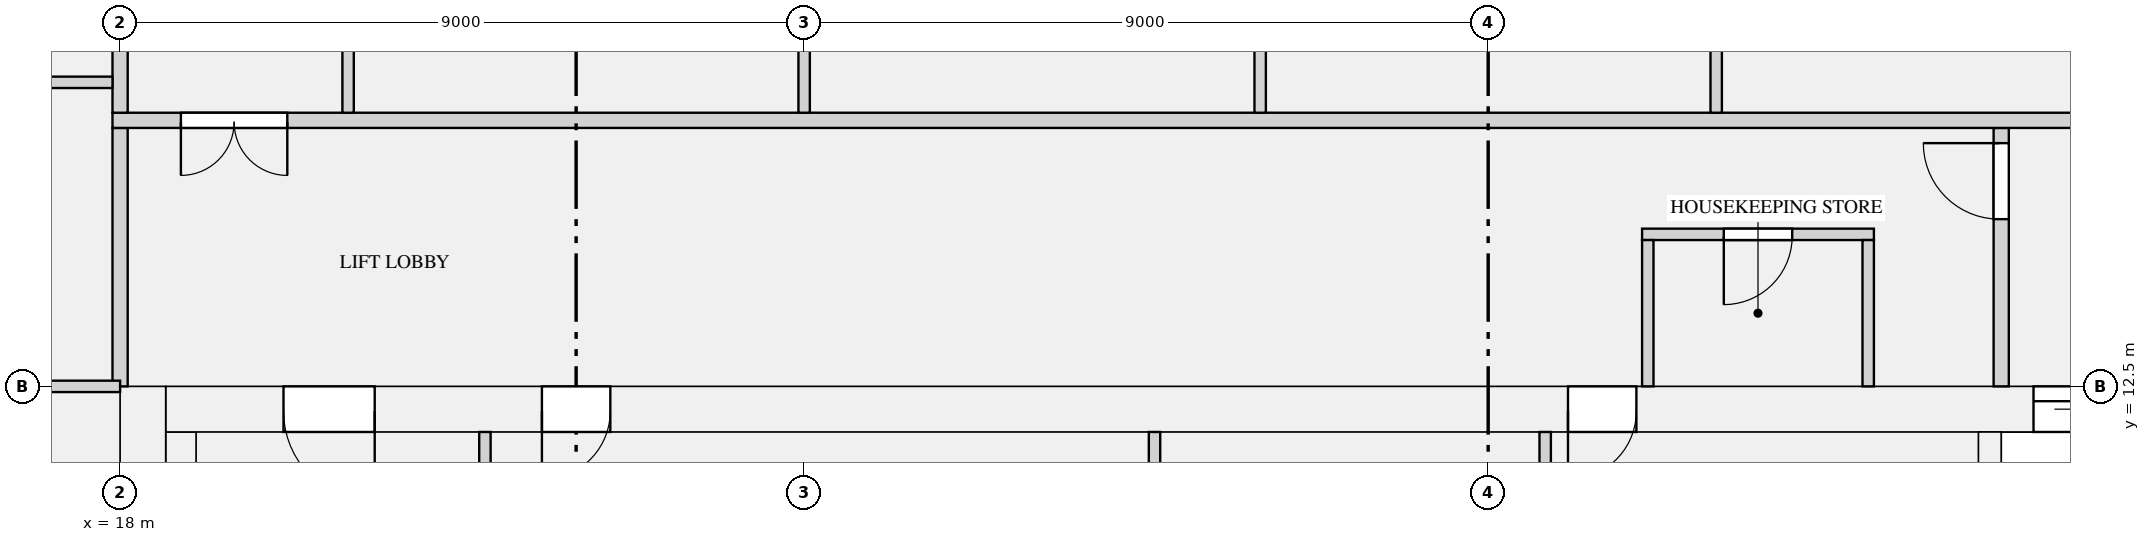
"""IFC4 building model, lengths in metres.
Left out: names, types, materials, properties, quantities, classifications, styles, units other than length and angle.
Written with IfcOpenShell. Run it as: python <this file> out.ifc"""

import sys

from ifc_helpers import new_model, si_unit, direction, frame, frame_2d, origin, place, context, subcontext, project, spatial, rectangle, extrude, element, fill, save


model = new_model("IFC4")
c1 = context("Model", 3, precision=1e-05, world=origin(), true_north=direction((0.0, 1.0)))
c2 = subcontext(c1, "Body", "Model", "MODEL_VIEW")
j1 = project(units=[si_unit("LENGTHUNIT", "METRE"), si_unit("PLANEANGLEUNIT", "RADIAN")], contexts=[c1])
p1 = place(None, origin())
s1 = spatial("IfcSite", under=j1, at=p1, CompositionType="ELEMENT")
p2 = place(p1, origin())
s2 = spatial("IfcBuilding", under=s1, at=p2, CompositionType="ELEMENT")
p3 = place(p2, frame((0.0, 0.0, 198.0)))
s3 = spatial("IfcBuildingStorey", under=s2, at=p3, CompositionType="ELEMENT", Elevation=198.0)
p4 = place(p3, frame((18.3, 0.0, 0.0), z_axis=(0.0, 0.0, 1.0), x_axis=(0.0, 1.0, 0.0)))
e1 = element("IfcWall", 1, at=p4, inside=s3, PredefinedType="SHEAR", context=c2, shape_type="SweptSolid", body=[
    extrude(rectangle(XDim=12.5, YDim=0.6, at=frame_2d((6.25, 0.0))), origin(), (0.0, 0.0, 1.0), 3.15),
])
p5 = place(p3, frame((18.6, 12.2, 0.0), z_axis=(0.0, 0.0, 1.0), x_axis=(1.0, 0.0, 0.0)))
e2 = element("IfcWall", 2, at=p5, inside=s3, PredefinedType="SHEAR", context=c2, shape_type="SweptSolid", body=[
    extrude(rectangle(XDim=34.8, YDim=0.6, at=frame_2d((17.4, 0.0))), origin(), (0.0, 0.0, 1.0), 3.15),
])
p6 = place(p5, frame((24.575, 0.0, 0.0)))
e3 = element("IfcOpeningElement", 3, at=p6, cuts=e2, PredefinedType="OPENING", context=c2, shape_type="SweptSolid", body=[
    extrude(rectangle(XDim=1.1, YDim=2.1, at=frame_2d((0.55, 1.05))), frame((0.0, 0.31, 0.0), z_axis=(0.0, -1.0, 0.0), x_axis=(1.0, 0.0, 0.0)), (0.0, 0.0, 1.0), 0.62),
])
p7 = place(p5, frame((26.825, 0.0, 0.0)))
e4 = element("IfcOpeningElement", 4, at=p7, cuts=e2, PredefinedType="OPENING", context=c2, shape_type="SweptSolid", body=[
    extrude(rectangle(XDim=1.1, YDim=2.1, at=frame_2d((0.55, 1.05))), frame((0.0, 0.31, 0.0), z_axis=(0.0, -1.0, 0.0), x_axis=(1.0, 0.0, 0.0)), (0.0, 0.0, 1.0), 0.62),
])
p8 = place(p5, frame((29.075, 0.0, 0.0)))
e5 = element("IfcOpeningElement", 5, at=p8, cuts=e2, PredefinedType="OPENING", context=c2, shape_type="SweptSolid", body=[
    extrude(rectangle(XDim=1.1, YDim=2.1, at=frame_2d((0.55, 1.05))), frame((0.0, 0.31, 0.0), z_axis=(0.0, -1.0, 0.0), x_axis=(1.0, 0.0, 0.0)), (0.0, 0.0, 1.0), 0.62),
])
p9 = place(p5, frame((4.95, 0.0, 0.0)))
e6 = element("IfcOpeningElement", 6, at=p9, cuts=e2, PredefinedType="OPENING", context=c2, shape_type="SweptSolid", body=[
    extrude(rectangle(XDim=0.9, YDim=2.1, at=frame_2d((0.45, 1.05))), frame((0.0, 0.31, 0.0), z_axis=(0.0, -1.0, 0.0), x_axis=(1.0, 0.0, 0.0)), (0.0, 0.0, 1.0), 0.62),
])
p10 = place(p5, frame((18.45, 0.0, 0.0)))
e7 = element("IfcOpeningElement", 7, at=p10, cuts=e2, PredefinedType="OPENING", context=c2, shape_type="SweptSolid", body=[
    extrude(rectangle(XDim=0.9, YDim=2.1, at=frame_2d((0.45, 1.05))), frame((0.0, 0.31, 0.0), z_axis=(0.0, -1.0, 0.0), x_axis=(1.0, 0.0, 0.0)), (0.0, 0.0, 1.0), 0.62),
])
p11 = place(p5, frame((1.55, 0.0, 0.0)))
e8 = element("IfcOpeningElement", 8, at=p11, cuts=e2, PredefinedType="OPENING", context=c2, shape_type="SweptSolid", body=[
    extrude(rectangle(XDim=1.2, YDim=2.1, at=frame_2d((0.6, 1.05))), frame((0.0, 0.31, 0.0), z_axis=(0.0, -1.0, 0.0), x_axis=(1.0, 0.0, 0.0)), (0.0, 0.0, 1.0), 0.62),
])
p12 = place(p5, frame((32.05, 0.0, 0.0)))
e9 = element("IfcOpeningElement", 9, at=p12, cuts=e2, PredefinedType="OPENING", context=c2, shape_type="SweptSolid", body=[
    extrude(rectangle(XDim=1.2, YDim=2.1, at=frame_2d((0.6, 1.05))), frame((0.0, 0.31, 0.0), z_axis=(0.0, -1.0, 0.0), x_axis=(1.0, 0.0, 0.0)), (0.0, 0.0, 1.0), 0.62),
])
p13 = place(p3, frame((18.8, 1.0, 0.0), z_axis=(0.0, 0.0, 1.0), x_axis=(0.0, 1.0, 0.0)))
e10 = element("IfcWall", 10, at=p13, inside=s3, PredefinedType="SHEAR", context=c2, shape_type="SweptSolid", body=[
    extrude(rectangle(XDim=10.9, YDim=0.4, at=frame_2d((5.45, 0.0))), origin(), (0.0, 0.0, 1.0), 3.15),
])
p14 = place(p3, frame((42.6, 8.25, 0.0), z_axis=(0.0, 0.0, 1.0), x_axis=(0.0, 1.0, 0.0)))
e11 = element("IfcWall", 11, at=p14, inside=s3, PredefinedType="SHEAR", context=c2, shape_type="SweptSolid", body=[
    extrude(rectangle(XDim=3.65, YDim=0.3, at=frame_2d((1.825, 0.0))), origin(), (0.0, 0.0, 1.0), 3.15),
])
p15 = place(p3, frame((38.025, 14.5, 0.0), z_axis=(0.0, 0.0, 1.0), x_axis=(1.0, 0.0, 0.0)))
e12 = element("IfcWall", 12, at=p15, inside=s3, PredefinedType="PARTITIONING", context=c2, shape_type="SweptSolid", body=[
    extrude(rectangle(XDim=3.05, YDim=0.15, at=frame_2d((1.525, 0.0))), origin(), (0.0, 0.0, 1.0), 2.83),
])
p16 = place(p15, frame((1.075, 0.0, 0.0)))
e13 = element("IfcOpeningElement", 13, at=p16, cuts=e12, PredefinedType="OPENING", context=c2, shape_type="SweptSolid", body=[
    extrude(rectangle(XDim=0.9, YDim=2.1, at=frame_2d((0.45, 1.05))), frame((0.0, 0.085, 0.0), z_axis=(0.0, -1.0, 0.0), x_axis=(1.0, 0.0, 0.0)), (0.0, 0.0, 1.0), 0.17),
])
p17 = place(p3, frame((36.75, 8.475, 0.0), z_axis=(0.0, 0.0, 1.0), x_axis=(0.0, 1.0, 0.0)))
e14 = element("IfcWall", 14, at=p17, inside=s3, PredefinedType="PARTITIONING", context=c2, shape_type="SweptSolid", body=[
    extrude(rectangle(XDim=3.425, YDim=0.15, at=frame_2d((1.712, 0.0))), origin(), (0.0, 0.0, 1.0), 2.83),
])
for number, where, z_axis, x_axis in (
    (15, (22.8, 8.905, 0.0), (0.0, 0.0, 1.0), (0.0, 1.0, 0.0)),
    (16, (31.61, 8.905, 0.0), (0.0, 0.0, 1.0), (0.0, 1.0, 0.0)),
):
    element("IfcWall", number, at=place(p3, frame(where, z_axis=z_axis, x_axis=x_axis)), inside=s3, PredefinedType="PARTITIONING", context=c2, shape_type="SweptSolid", body=[
        extrude(rectangle(XDim=2.995, YDim=0.15, at=frame_2d((1.498, 0.0))), origin(), (0.0, 0.0, 1.0), 2.83),
    ])
p18 = place(p3, frame((18.0, 12.5, 0.0), z_axis=(0.0, 0.0, 1.0), x_axis=(0.0, 1.0, 0.0)))
e17 = element("IfcWall", 17, at=p18, inside=s3, PredefinedType="PARTITIONING", context=c2, shape_type="SweptSolid", body=[
    extrude(rectangle(XDim=3.4, YDim=0.2, at=frame_2d((1.7, 0.0))), origin(), (0.0, 0.0, 1.0), 2.83),
])
for number, where, z_axis, x_axis in (
    (18, (38.1, 12.5, 0.0), (0.0, 0.0, 1.0), (0.0, 1.0, 0.0)),
    (19, (41.0, 12.5, 0.0), (0.0, 0.0, 1.0), (0.0, 1.0, 0.0)),
):
    element("IfcWall", number, at=place(p3, frame(where, z_axis=z_axis, x_axis=x_axis)), inside=s3, PredefinedType="PARTITIONING", context=c2, shape_type="SweptSolid", body=[
        extrude(rectangle(XDim=1.925, YDim=0.15, at=frame_2d((0.962, 0.0))), origin(), (0.0, 0.0, 1.0), 2.83),
    ])
p19 = place(p3, frame((42.75, 12.5, 0.0), z_axis=(0.0, 0.0, 1.0), x_axis=(0.0, 1.0, 0.0)))
e20 = element("IfcWall", 20, at=p19, inside=s3, PredefinedType="PARTITIONING", context=c2, shape_type="SweptSolid", body=[
    extrude(rectangle(XDim=3.4, YDim=0.2, at=frame_2d((1.7, 0.0))), origin(), (0.0, 0.0, 1.0), 2.83),
])
p20 = place(p19, frame((2.2, 0.0, 0.0)))
e21 = element("IfcOpeningElement", 21, at=p20, cuts=e20, PredefinedType="OPENING", context=c2, shape_type="SweptSolid", body=[
    extrude(rectangle(XDim=1.0, YDim=2.1, at=frame_2d((0.5, 1.05))), frame((0.0, 0.11, 0.0), z_axis=(0.0, -1.0, 0.0), x_axis=(1.0, 0.0, 0.0)), (0.0, 0.0, 1.0), 0.22),
])
p21 = place(p3, frame((12.15, 16.5, 0.0), z_axis=(0.0, 0.0, 1.0), x_axis=(1.0, 0.0, 0.0)))
e22 = element("IfcWall", 22, at=p21, inside=s3, PredefinedType="PARTITIONING", context=c2, shape_type="SweptSolid", body=[
    extrude(rectangle(XDim=5.75, YDim=0.15, at=frame_2d((2.875, 0.0))), origin(), (0.0, 0.0, 1.0), 2.83),
])
p22 = place(p21, frame((3.4, 0.0, 0.0)))
e23 = element("IfcOpeningElement", 23, at=p22, cuts=e22, PredefinedType="OPENING", context=c2, shape_type="SweptSolid", body=[
    extrude(rectangle(XDim=0.9, YDim=2.1, at=frame_2d((0.45, 1.05))), frame((0.0, 0.085, 0.0), z_axis=(0.0, -1.0, 0.0), x_axis=(1.0, 0.0, 0.0)), (0.0, 0.0, 1.0), 0.17),
])
p23 = place(p21, frame((0.4, 0.0, 0.0)))
e24 = element("IfcOpeningElement", 24, at=p23, cuts=e22, PredefinedType="OPENING", context=c2, shape_type="SweptSolid", body=[
    extrude(rectangle(XDim=0.9, YDim=2.1, at=frame_2d((0.45, 1.05))), frame((0.0, 0.085, 0.0), z_axis=(0.0, -1.0, 0.0), x_axis=(1.0, 0.0, 0.0)), (0.0, 0.0, 1.0), 0.17),
])
p24 = place(p3, frame((9.65, 12.5, 0.0), z_axis=(0.0, 0.0, 1.0), x_axis=(1.0, 0.0, 0.0)))
e25 = element("IfcWall", 25, at=p24, inside=s3, PredefinedType="PARTITIONING", context=c2, shape_type="SweptSolid", body=[
    extrude(rectangle(XDim=8.35, YDim=0.15, at=frame_2d((4.175, 0.0))), origin(), (0.0, 0.0, 1.0), 2.83),
])
p25 = place(p24, frame((5.9, 0.0, 0.0)))
e26 = element("IfcOpeningElement", 26, at=p25, cuts=e25, PredefinedType="OPENING", context=c2, shape_type="SweptSolid", body=[
    extrude(rectangle(XDim=0.9, YDim=2.1, at=frame_2d((0.45, 1.05))), frame((0.0, 0.085, 0.0), z_axis=(0.0, -1.0, 0.0), x_axis=(1.0, 0.0, 0.0)), (0.0, 0.0, 1.0), 0.17),
])
p26 = place(p3, frame((17.9, 16.0, 0.0), z_axis=(0.0, 0.0, 1.0), x_axis=(1.0, 0.0, 0.0)))
e27 = element("IfcWall", 27, at=p26, inside=s3, PredefinedType="PARTITIONING", context=c2, shape_type="SweptSolid", body=[
    extrude(rectangle(XDim=36.2, YDim=0.2, at=frame_2d((18.1, 0.0))), origin(), (0.0, 0.0, 1.0), 2.83),
])
p27 = place(p26, frame((0.9, 0.0, 0.0)))
e28 = element("IfcOpeningElement", 28, at=p27, cuts=e27, PredefinedType="OPENING", context=c2, shape_type="SweptSolid", body=[
    extrude(rectangle(XDim=1.4, YDim=2.1, at=frame_2d((0.7, 1.05))), frame((0.0, 0.11, 0.0), z_axis=(0.0, -1.0, 0.0), x_axis=(1.0, 0.0, 0.0)), (0.0, 0.0, 1.0), 0.22),
])
p28 = place(p26, frame((33.9, 0.0, 0.0)))
e29 = element("IfcOpeningElement", 29, at=p28, cuts=e27, PredefinedType="OPENING", context=c2, shape_type="SweptSolid", body=[
    extrude(rectangle(XDim=1.4, YDim=2.1, at=frame_2d((0.7, 1.05))), frame((0.0, 0.11, 0.0), z_axis=(0.0, -1.0, 0.0), x_axis=(1.0, 0.0, 0.0)), (0.0, 0.0, 1.0), 0.22),
])
p29 = place(p3, frame((18.0, 16.1, 0.0), z_axis=(0.0, 0.0, 1.0), x_axis=(0.0, 1.0, 0.0)))
e30 = element("IfcWall", 30, at=p29, inside=s3, PredefinedType="PARTITIONING", context=c2, shape_type="SweptSolid", body=[
    extrude(rectangle(XDim=7.8, YDim=0.2, at=frame_2d((3.9, 0.0))), origin(), (0.0, 0.0, 1.0), 2.83),
])
p30 = place(p29, frame((5.35, 0.0, 0.0)))
e31 = element("IfcOpeningElement", 31, at=p30, cuts=e30, PredefinedType="OPENING", context=c2, shape_type="SweptSolid", body=[
    extrude(rectangle(XDim=1.1, YDim=2.1, at=frame_2d((0.55, 1.05))), frame((0.0, 0.11, 0.0), z_axis=(0.0, -1.0, 0.0), x_axis=(1.0, 0.0, 0.0)), (0.0, 0.0, 1.0), 0.22),
])
for number, where, z_axis, x_axis in (
    (32, (21.0, 16.1, 0.0), (0.0, 0.0, 1.0), (0.0, 1.0, 0.0)),
    (33, (27.0, 16.1, 0.0), (0.0, 0.0, 1.0), (0.0, 1.0, 0.0)),
    (34, (33.0, 16.1, 0.0), (0.0, 0.0, 1.0), (0.0, 1.0, 0.0)),
    (35, (39.0, 16.1, 0.0), (0.0, 0.0, 1.0), (0.0, 1.0, 0.0)),
):
    element("IfcWall", number, at=place(p3, frame(where, z_axis=z_axis, x_axis=x_axis)), inside=s3, PredefinedType="PARTITIONING", context=c2, shape_type="SweptSolid", body=[
        extrude(rectangle(XDim=4.825, YDim=0.15, at=frame_2d((2.413, 0.0))), origin(), (0.0, 0.0, 1.0), 2.83),
    ])
p31 = place(p6, origin())
e36 = element("IfcDoor", 36, at=p31, inside=s3, OperationType="DOUBLE_DOOR_SLIDING", PredefinedType="DOOR", context=c2, shape_type="SweptSolid", body=[
    extrude(rectangle(XDim=1.1, YDim=2.1, at=frame_2d((0.55, 1.05))), frame((0.0, 0.025, 0.0), z_axis=(0.0, -1.0, 0.0), x_axis=(1.0, 0.0, 0.0)), (0.0, 0.0, 1.0), 0.05),
])
fill(e3, e36)
p32 = place(p16, frame((0.9, 0.0, 0.0), z_axis=(0.0, 0.0, 1.0), x_axis=(-1.0, 0.0, 0.0)))
e37 = element("IfcDoor", 37, at=p32, inside=s3, OperationType="SINGLE_SWING_RIGHT", PredefinedType="DOOR", context=c2, shape_type="SweptSolid", body=[
    extrude(rectangle(XDim=0.9, YDim=2.1, at=frame_2d((0.45, 1.05))), frame((0.0, 0.025, 0.0), z_axis=(0.0, -1.0, 0.0), x_axis=(1.0, 0.0, 0.0)), (0.0, 0.0, 1.0), 0.05),
])
fill(e13, e37)
p33 = place(p9, frame((0.9, 0.0, 0.0), z_axis=(0.0, 0.0, 1.0), x_axis=(-1.0, 0.0, 0.0)))
e38 = element("IfcDoor", 38, at=p33, inside=s3, OperationType="SINGLE_SWING_RIGHT", PredefinedType="DOOR", context=c2, shape_type="SweptSolid", body=[
    extrude(rectangle(XDim=0.9, YDim=2.1, at=frame_2d((0.45, 1.05))), frame((0.0, 0.025, 0.0), z_axis=(0.0, -1.0, 0.0), x_axis=(1.0, 0.0, 0.0)), (0.0, 0.0, 1.0), 0.05),
])
fill(e6, e38)
p34 = place(p10, frame((0.9, 0.0, 0.0), z_axis=(0.0, 0.0, 1.0), x_axis=(-1.0, 0.0, 0.0)))
e39 = element("IfcDoor", 39, at=p34, inside=s3, OperationType="SINGLE_SWING_RIGHT", PredefinedType="DOOR", context=c2, shape_type="SweptSolid", body=[
    extrude(rectangle(XDim=0.9, YDim=2.1, at=frame_2d((0.45, 1.05))), frame((0.0, 0.025, 0.0), z_axis=(0.0, -1.0, 0.0), x_axis=(1.0, 0.0, 0.0)), (0.0, 0.0, 1.0), 0.05),
])
fill(e7, e39)
p35 = place(p11, frame((1.2, 0.0, 0.0), z_axis=(0.0, 0.0, 1.0), x_axis=(-1.0, 0.0, 0.0)))
e40 = element("IfcDoor", 40, at=p35, inside=s3, OperationType="SINGLE_SWING_LEFT", PredefinedType="DOOR", context=c2, shape_type="SweptSolid", body=[
    extrude(rectangle(XDim=1.2, YDim=2.1, at=frame_2d((0.6, 1.05))), frame((0.0, 0.025, 0.0), z_axis=(0.0, -1.0, 0.0), x_axis=(1.0, 0.0, 0.0)), (0.0, 0.0, 1.0), 0.05),
])
fill(e8, e40)
p36 = place(p20, origin())
e41 = element("IfcDoor", 41, at=p36, inside=s3, OperationType="SINGLE_SWING_RIGHT", PredefinedType="DOOR", context=c2, shape_type="SweptSolid", body=[
    extrude(rectangle(XDim=1.0, YDim=2.1, at=frame_2d((0.5, 1.05))), frame((0.0, 0.025, 0.0), z_axis=(0.0, -1.0, 0.0), x_axis=(1.0, 0.0, 0.0)), (0.0, 0.0, 1.0), 0.05),
])
fill(e21, e41)
p37 = place(p27, frame((1.4, 0.0, 0.0), z_axis=(0.0, 0.0, 1.0), x_axis=(-1.0, 0.0, 0.0)))
e42 = element("IfcDoor", 42, at=p37, inside=s3, OperationType="DOUBLE_DOOR_SINGLE_SWING", PredefinedType="DOOR", context=c2, shape_type="SweptSolid", body=[
    extrude(rectangle(XDim=1.4, YDim=2.1, at=frame_2d((0.7, 1.05))), frame((0.0, 0.025, 0.0), z_axis=(0.0, -1.0, 0.0), x_axis=(1.0, 0.0, 0.0)), (0.0, 0.0, 1.0), 0.05),
])
fill(e28, e42)
save(model, sys.argv[1])
